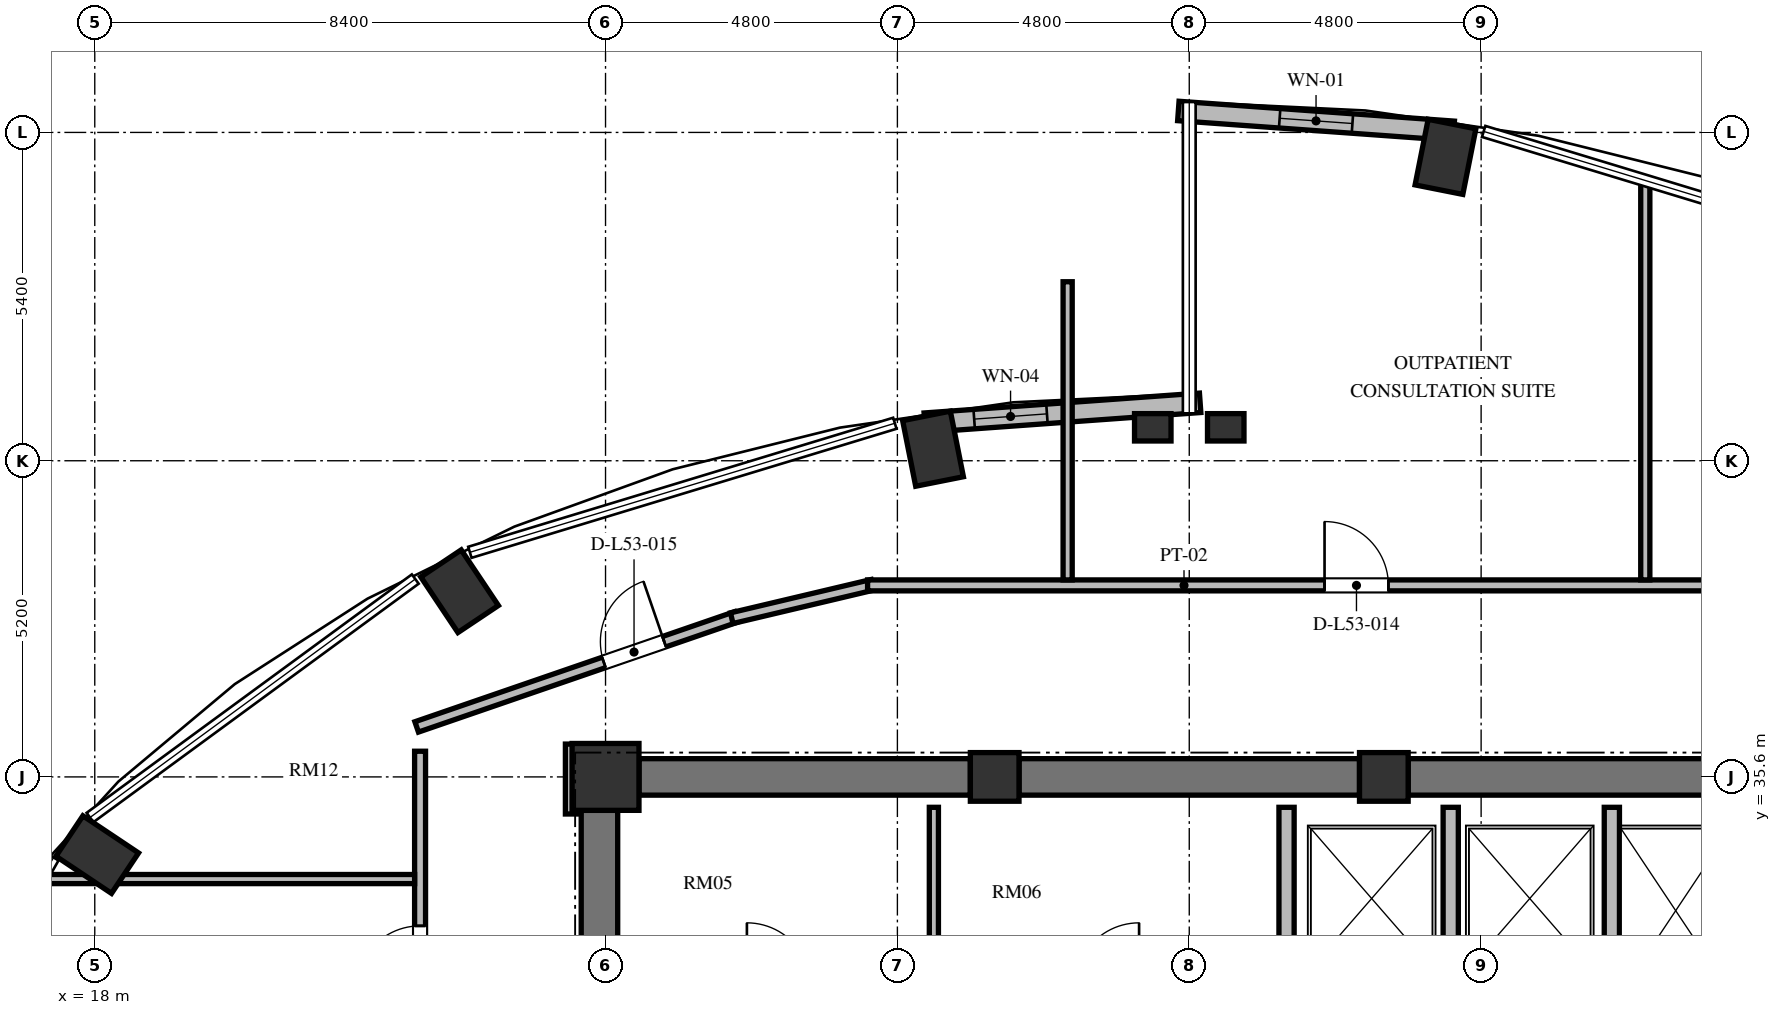
"""IFC4 building model, lengths in metres.
Left out: names, types, materials, properties, quantities, classifications, styles, units other than length and angle.
Written with IfcOpenShell. Run it as: python <this file> out.ifc"""

import sys

from ifc_helpers import new_model, si_unit, direction, frame, frame_2d, origin, origin_2d, place, context, subcontext, project, spatial, rectangle, extrude, element, fill, save


model = new_model("IFC4")
c1 = context("Model", 3, precision=1e-05, world=origin(), true_north=direction((0.0, 1.0)))
c2 = subcontext(c1, "Body", "Model", "MODEL_VIEW")
j1 = project(units=[si_unit("LENGTHUNIT", "METRE"), si_unit("PLANEANGLEUNIT", "RADIAN")], contexts=[c1])
p1 = place(None, origin())
s1 = spatial("IfcSite", under=j1, at=p1, CompositionType="ELEMENT")
p2 = place(p1, origin())
s2 = spatial("IfcBuilding", under=s1, at=p2, CompositionType="ELEMENT")
p3 = place(p2, frame((0.0, 0.0, 205.776)))
s3 = spatial("IfcBuildingStorey", under=s2, at=p3, CompositionType="ELEMENT", Elevation=205.776)
for number, where, z_axis, x_axis in (
    (1, (40.214, 45.798, 0.0), (0.0, 0.0, 1.0), (0.195, 0.981, 0.0)),
    (2, (31.786, 40.998, 0.0), (0.0, 0.0, 1.0), (-0.195, 0.981, 0.0)),
    (3, (24.0, 38.654, 0.0), (0.0, 0.0, 1.0), (-0.556, 0.831, 0.0)),
    (4, (18.04, 34.323, 0.0), (0.0, 0.0, 1.0), (-0.831, 0.556, 0.0)),
):
    element("IfcColumn", number, at=place(p3, frame(where, z_axis=z_axis, x_axis=x_axis)), inside=s3, PredefinedType="COLUMN", context=c2, shape_type="SweptSolid", body=[
        extrude(rectangle(XDim=1.1, YDim=0.8, at=origin_2d()), origin(), (0.0, 0.0, 1.0), 3.648),
    ])
for number, where, z_axis, x_axis in (
    (5, (39.2, 35.6, 0.0), (0.0, 0.0, 1.0), (1.0, 0.0, 0.0)),
    (6, (32.8, 35.6, 0.0), (0.0, 0.0, 1.0), (1.0, 0.0, 0.0)),
):
    element("IfcColumn", number, at=place(p3, frame(where, z_axis=z_axis, x_axis=x_axis)), inside=s3, PredefinedType="COLUMN", context=c2, shape_type="SweptSolid", body=[
        extrude(rectangle(XDim=0.8, YDim=0.8, at=origin_2d()), origin(), (0.0, 0.0, 1.0), 3.648),
    ])
p4 = place(p3, frame((26.4, 35.6, 0.0), z_axis=(0.0, 0.0, 1.0), x_axis=(1.0, 0.0, 0.0)))
e7 = element("IfcColumn", 7, at=p4, inside=s3, PredefinedType="COLUMN", context=c2, shape_type="SweptSolid", body=[
    extrude(rectangle(XDim=1.1, YDim=1.1, at=origin_2d()), origin(), (0.0, 0.0, 1.0), 3.648),
])
for number, where, z_axis, x_axis in (
    (8, (35.4, 41.35, 0.0), (0.0, 0.0, 1.0), (1.0, 0.0, 0.0)),
    (9, (36.6, 41.35, 0.0), (0.0, 0.0, 1.0), (1.0, 0.0, 0.0)),
):
    element("IfcColumn", number, at=place(p3, frame(where, z_axis=z_axis, x_axis=x_axis)), inside=s3, PredefinedType="PILASTER", context=c2, shape_type="SweptSolid", body=[
        extrude(rectangle(XDim=0.6, YDim=0.45, at=origin_2d()), origin(), (0.0, 0.0, 1.0), 3.648),
    ])
p5 = place(p3, frame((26.3, 20.95, 0.0), z_axis=(0.0, 0.0, 1.0), x_axis=(0.0, 1.0, 0.0)))
e10 = element("IfcWall", 10, at=p5, inside=s3, PredefinedType="SHEAR", context=c2, shape_type="SweptSolid", body=[
    extrude(rectangle(XDim=14.1, YDim=0.6, at=frame_2d((7.05, 0.0))), origin(), (0.0, 0.0, 1.0), 3.648),
])
p6 = place(p5, frame((6.5, 0.0, 0.0)))
e11 = element("IfcOpeningElement", 11, at=p6, cuts=e10, PredefinedType="OPENING", context=c2, shape_type="SweptSolid", body=[
    extrude(rectangle(XDim=1.2, YDim=2.15, at=frame_2d((0.6, 1.075))), frame((0.0, 0.31, 0.0), z_axis=(0.0, -1.0, 0.0), x_axis=(1.0, 0.0, 0.0)), (0.0, 0.0, 1.0), 0.62),
])
p7 = place(p5, frame((9.6, 0.0, 0.0)))
e12 = element("IfcOpeningElement", 12, at=p7, cuts=e10, PredefinedType="OPENING", context=c2, shape_type="SweptSolid", body=[
    extrude(rectangle(XDim=1.3, YDim=2.2, at=frame_2d((0.65, 1.1))), frame((0.0, 0.31, 0.0), z_axis=(0.0, -1.0, 0.0), x_axis=(1.0, 0.0, 0.0)), (0.0, 0.0, 1.0), 0.62),
])
p8 = place(p5, frame((3.26, 0.0, 0.0)))
e13 = element("IfcOpeningElement", 13, at=p8, cuts=e10, PredefinedType="OPENING", context=c2, shape_type="SweptSolid", body=[
    extrude(rectangle(XDim=1.3, YDim=2.2, at=frame_2d((0.65, 1.1))), frame((0.0, 0.31, 0.0), z_axis=(0.0, -1.0, 0.0), x_axis=(1.0, 0.0, 0.0)), (0.0, 0.0, 1.0), 0.62),
])
p9 = place(p3, frame((26.95, 35.6, 0.0), z_axis=(0.0, 0.0, 1.0), x_axis=(1.0, 0.0, 0.0)))
e14 = element("IfcWall", 14, at=p9, inside=s3, PredefinedType="SHEAR", context=c2, shape_type="SweptSolid", body=[
    extrude(rectangle(XDim=5.45, YDim=0.6, at=frame_2d((2.725, 0.0))), origin(), (0.0, 0.0, 1.0), 3.648),
])
p10 = place(p3, frame((33.2, 35.6, 0.0), z_axis=(0.0, 0.0, 1.0), x_axis=(1.0, 0.0, 0.0)))
e15 = element("IfcWall", 15, at=p10, inside=s3, PredefinedType="SHEAR", context=c2, shape_type="SweptSolid", body=[
    extrude(rectangle(XDim=5.6, YDim=0.6, at=frame_2d((2.8, 0.0))), origin(), (0.0, 0.0, 1.0), 3.648),
])
p11 = place(p3, frame((39.6, 35.6, 0.0), z_axis=(0.0, 0.0, 1.0), x_axis=(1.0, 0.0, 0.0)))
e16 = element("IfcWall", 16, at=p11, inside=s3, PredefinedType="SHEAR", context=c2, shape_type="SweptSolid", body=[
    extrude(rectangle(XDim=5.45, YDim=0.6, at=frame_2d((2.725, 0.0))), origin(), (0.0, 0.0, 1.0), 3.648),
])
p12 = place(p3, frame((40.35, 46.226, 0.0), z_axis=(0.0, 0.0, 1.0), x_axis=(-0.997409061056, 0.071938619141, 0.0)))
e17 = element("IfcWall", 17, at=p12, inside=s3, PredefinedType="SOLIDWALL", context=c2, shape_type="SweptSolid", body=[
    extrude(rectangle(XDim=4.541, YDim=0.32, at=frame_2d((2.271, 0.0))), origin(), (0.0, 0.0, 1.0), 3.448),
])
p13 = place(p12, frame((1.67, 0.0, 0.85)))
e18 = element("IfcOpeningElement", 18, at=p13, cuts=e17, PredefinedType="OPENING", context=c2, shape_type="SweptSolid", body=[
    extrude(rectangle(XDim=1.2, YDim=2.2, at=frame_2d((0.6, 1.1))), frame((0.0, 0.17, 0.0), z_axis=(0.0, -1.0, 0.0), x_axis=(1.0, 0.0, 0.0)), (0.0, 0.0, 1.0), 0.34),
])
p14 = place(p3, frame((36.179, 41.753, 0.0), z_axis=(0.0, 0.0, 1.0), x_axis=(-0.997408782787, -0.071942477163, 0.0)))
e19 = element("IfcWall", 19, at=p14, inside=s3, PredefinedType="SOLIDWALL", context=c2, shape_type="SweptSolid", body=[
    extrude(rectangle(XDim=4.541, YDim=0.32, at=frame_2d((2.27, 0.0))), origin(), (0.0, 0.0, 1.0), 3.448),
])
p15 = place(p14, frame((2.526, 0.0, 0.85)))
e20 = element("IfcOpeningElement", 20, at=p15, cuts=e19, PredefinedType="OPENING", context=c2, shape_type="SweptSolid", body=[
    extrude(rectangle(XDim=1.2, YDim=1.8, at=frame_2d((0.6, 0.9))), frame((0.0, 0.17, 0.0), z_axis=(0.0, -1.0, 0.0), x_axis=(1.0, 0.0, 0.0)), (0.0, 0.0, 1.0), 0.34),
])
p16 = place(p3, frame((42.95, 31.92, 0.0), z_axis=(0.0, 0.0, 1.0), x_axis=(0.0, 1.0, 0.0)))
e21 = element("IfcWall", 21, at=p16, inside=s3, PredefinedType="SOLIDWALL", context=c2, shape_type="SweptSolid", body=[
    extrude(rectangle(XDim=3.18, YDim=0.25, at=frame_2d((1.59, 0.0))), origin(), (0.0, 0.0, 1.0), 3.448),
])
for number, where, z_axis, x_axis in (
    (22, (37.6, 32.42, 0.0), (0.0, 0.0, 1.0), (0.0, 1.0, 0.0)),
    (23, (40.3, 32.42, 0.0), (0.0, 0.0, 1.0), (0.0, 1.0, 0.0)),
):
    element("IfcWall", number, at=place(p3, frame(where, z_axis=z_axis, x_axis=x_axis)), inside=s3, PredefinedType="SOLIDWALL", context=c2, shape_type="SweptSolid", body=[
        extrude(rectangle(XDim=2.68, YDim=0.25, at=frame_2d((1.34, 0.0))), origin(), (0.0, 0.0, 1.0), 3.448),
    ])
p17 = place(p3, frame((31.8, 32.42, 0.0), z_axis=(0.0, 0.0, 1.0), x_axis=(0.0, 1.0, 0.0)))
e24 = element("IfcWall", 24, at=p17, inside=s3, PredefinedType="PARTITIONING", context=c2, shape_type="SweptSolid", body=[
    extrude(rectangle(XDim=2.68, YDim=0.15, at=frame_2d((1.34, 0.0))), origin(), (0.0, 0.0, 1.0), 3.448),
])
p18 = place(p3, frame((23.294, 36.422, 0.0), z_axis=(0.0, 0.0, 1.0), x_axis=(0.945493277461, 0.325641616316, 0.0)))
e25 = element("IfcWall", 25, at=p18, inside=s3, PredefinedType="PARTITIONING", context=c2, shape_type="SweptSolid", body=[
    extrude(rectangle(XDim=5.562, YDim=0.18, at=frame_2d((2.781, 0.0))), origin(), (0.0, 0.0, 1.0), 3.073),
])
p19 = place(p18, frame((3.256, 0.0, 0.0)))
e26 = element("IfcOpeningElement", 26, at=p19, cuts=e25, PredefinedType="OPENING", context=c2, shape_type="SweptSolid", body=[
    extrude(rectangle(XDim=1.05, YDim=2.15, at=frame_2d((0.525, 1.075))), frame((0.0, 0.1, 0.0), z_axis=(0.0, -1.0, 0.0), x_axis=(1.0, 0.0, 0.0)), (0.0, 0.0, 1.0), 0.2),
])
p20 = place(p3, frame((28.476, 38.211, 0.0), z_axis=(0.0, 0.0, 1.0), x_axis=(0.973030562203, 0.230676234189, 0.0)))
e27 = element("IfcWall", 27, at=p20, inside=s3, PredefinedType="PARTITIONING", context=c2, shape_type="SweptSolid", body=[
    extrude(rectangle(XDim=2.377, YDim=0.18, at=frame_2d((1.188, 0.0))), origin(), (0.0, 0.0, 1.0), 3.448),
])
p21 = place(p3, frame((30.71, 38.75, 0.0), z_axis=(0.0, 0.0, 1.0), x_axis=(1.0, 0.0, 0.0)))
e28 = element("IfcWall", 28, at=p21, inside=s3, PredefinedType="PARTITIONING", context=c2, shape_type="SweptSolid", body=[
    extrude(rectangle(XDim=20.815, YDim=0.18, at=frame_2d((10.408, 0.0))), origin(), (0.0, 0.0, 1.0), 3.073),
])
p22 = place(p21, frame((7.515, 0.0, 0.0)))
e29 = element("IfcOpeningElement", 29, at=p22, cuts=e28, PredefinedType="OPENING", context=c2, shape_type="SweptSolid", body=[
    extrude(rectangle(XDim=1.05, YDim=2.15, at=frame_2d((0.525, 1.075))), frame((0.0, 0.1, 0.0), z_axis=(0.0, -1.0, 0.0), x_axis=(1.0, 0.0, 0.0)), (0.0, 0.0, 1.0), 0.2),
])
p23 = place(p3, frame((25.83, 36.14, 0.0), z_axis=(0.0, 0.0, 1.0), x_axis=(0.0, -1.0, 0.0)))
e30 = element("IfcWall", 30, at=p23, inside=s3, PredefinedType="PARTITIONING", context=c2, shape_type="SweptSolid", body=[
    extrude(rectangle(XDim=1.15, YDim=0.18, at=frame_2d((0.575, 0.0))), origin(), (0.0, 0.0, 1.0), 3.448),
])
p24 = place(p3, frame((23.35, 19.98, 0.0), z_axis=(0.0, 0.0, 1.0), x_axis=(0.0, 1.0, 0.0)))
e31 = element("IfcWall", 31, at=p24, inside=s3, PredefinedType="PARTITIONING", context=c2, shape_type="SweptSolid", body=[
    extrude(rectangle(XDim=16.042, YDim=0.18, at=frame_2d((8.021, 0.0))), origin(), (0.0, 0.0, 1.0), 3.448),
])
p25 = place(p24, frame((6.975, 0.0, 0.0)))
e32 = element("IfcOpeningElement", 32, at=p25, cuts=e31, PredefinedType="OPENING", context=c2, shape_type="SweptSolid", body=[
    extrude(rectangle(XDim=1.05, YDim=2.15, at=frame_2d((0.525, 1.075))), frame((0.0, 0.1, 0.0), z_axis=(0.0, -1.0, 0.0), x_axis=(1.0, 0.0, 0.0)), (0.0, 0.0, 1.0), 0.2),
])
p26 = place(p24, frame((4.353, 0.0, 0.0)))
e33 = element("IfcOpeningElement", 33, at=p26, cuts=e31, PredefinedType="OPENING", context=c2, shape_type="SweptSolid", body=[
    extrude(rectangle(XDim=1.05, YDim=2.15, at=frame_2d((0.525, 1.075))), frame((0.0, 0.1, 0.0), z_axis=(0.0, -1.0, 0.0), x_axis=(1.0, 0.0, 0.0)), (0.0, 0.0, 1.0), 0.2),
])
p27 = place(p24, frame((12.12, 0.0, 0.0)))
e34 = element("IfcOpeningElement", 34, at=p27, cuts=e31, PredefinedType="OPENING", context=c2, shape_type="SweptSolid", body=[
    extrude(rectangle(XDim=1.05, YDim=2.15, at=frame_2d((0.525, 1.075))), frame((0.0, 0.1, 0.0), z_axis=(0.0, -1.0, 0.0), x_axis=(1.0, 0.0, 0.0)), (0.0, 0.0, 1.0), 0.2),
])
p28 = place(p24, frame((9.537, 0.0, 0.0)))
e35 = element("IfcOpeningElement", 35, at=p28, cuts=e31, PredefinedType="OPENING", context=c2, shape_type="SweptSolid", body=[
    extrude(rectangle(XDim=1.05, YDim=2.15, at=frame_2d((0.525, 1.075))), frame((0.0, 0.1, 0.0), z_axis=(0.0, -1.0, 0.0), x_axis=(1.0, 0.0, 0.0)), (0.0, 0.0, 1.0), 0.2),
])
p29 = place(p3, frame((17.132, 33.92, 0.0), z_axis=(0.0, 0.0, 1.0), x_axis=(1.0, 0.0, 0.0)))
e36 = element("IfcWall", 36, at=p29, inside=s3, PredefinedType="PARTITIONING", context=c2, shape_type="SweptSolid", body=[
    extrude(rectangle(XDim=6.128, YDim=0.15, at=frame_2d((3.064, 0.0))), origin(), (0.0, 0.0, 1.0), 3.448),
])
p30 = place(p3, frame((34.0, 38.84, 0.0), z_axis=(0.0, 0.0, 1.0), x_axis=(0.0, 1.0, 0.0)))
e37 = element("IfcWall", 37, at=p30, inside=s3, PredefinedType="PARTITIONING", context=c2, shape_type="SweptSolid", body=[
    extrude(rectangle(XDim=4.904, YDim=0.15, at=frame_2d((2.452, 0.0))), origin(), (0.0, 0.0, 1.0), 3.448),
])
p31 = place(p3, frame((43.5, 38.84, 0.0), z_axis=(0.0, 0.0, 1.0), x_axis=(0.0, 1.0, 0.0)))
e38 = element("IfcWall", 38, at=p31, inside=s3, PredefinedType="PARTITIONING", context=c2, shape_type="SweptSolid", body=[
    extrude(rectangle(XDim=6.552, YDim=0.15, at=frame_2d((3.276, 0.0))), origin(), (0.0, 0.0, 1.0), 3.448),
])
p32 = place(p13, origin())
e39 = element("IfcWindow", 39, at=p32, inside=s3, PartitioningType="SINGLE_PANEL", PredefinedType="WINDOW", context=c2, shape_type="SweptSolid", body=[
    extrude(rectangle(XDim=1.2, YDim=2.2, at=frame_2d((0.6, 1.1))), frame((0.0, 0.03, 0.0), z_axis=(0.0, -1.0, 0.0), x_axis=(1.0, 0.0, 0.0)), (0.0, 0.0, 1.0), 0.06),
])
fill(e18, e39)
p33 = place(p15, origin())
e40 = element("IfcWindow", 40, at=p33, inside=s3, PartitioningType="SINGLE_PANEL", PredefinedType="WINDOW", context=c2, shape_type="SweptSolid", body=[
    extrude(rectangle(XDim=1.2, YDim=1.8, at=frame_2d((0.6, 0.9))), frame((0.0, 0.03, 0.0), z_axis=(0.0, -1.0, 0.0), x_axis=(1.0, 0.0, 0.0)), (0.0, 0.0, 1.0), 0.06),
])
fill(e20, e40)
p34 = place(p22, origin())
e41 = element("IfcDoor", 41, at=p34, inside=s3, OperationType="SINGLE_SWING_LEFT", PredefinedType="DOOR", context=c2, shape_type="SweptSolid", body=[
    extrude(rectangle(XDim=1.05, YDim=2.15, at=frame_2d((0.525, 1.075))), frame((0.0, 0.025, 0.0), z_axis=(0.0, -1.0, 0.0), x_axis=(1.0, 0.0, 0.0)), (0.0, 0.0, 1.0), 0.05),
])
fill(e29, e41)
p35 = place(p19, origin())
e42 = element("IfcDoor", 42, at=p35, inside=s3, OperationType="SINGLE_SWING_RIGHT", PredefinedType="DOOR", context=c2, shape_type="SweptSolid", body=[
    extrude(rectangle(XDim=1.05, YDim=2.15, at=frame_2d((0.525, 1.075))), frame((0.0, 0.025, 0.0), z_axis=(0.0, -1.0, 0.0), x_axis=(1.0, 0.0, 0.0)), (0.0, 0.0, 1.0), 0.05),
])
fill(e26, e42)
p36 = place(p27, origin())
e43 = element("IfcDoor", 43, at=p36, inside=s3, OperationType="SINGLE_SWING_LEFT", PredefinedType="DOOR", context=c2, shape_type="SweptSolid", body=[
    extrude(rectangle(XDim=1.05, YDim=2.15, at=frame_2d((0.525, 1.075))), frame((0.0, 0.025, 0.0), z_axis=(0.0, -1.0, 0.0), x_axis=(1.0, 0.0, 0.0)), (0.0, 0.0, 1.0), 0.05),
])
fill(e34, e43)
save(model, sys.argv[1])
